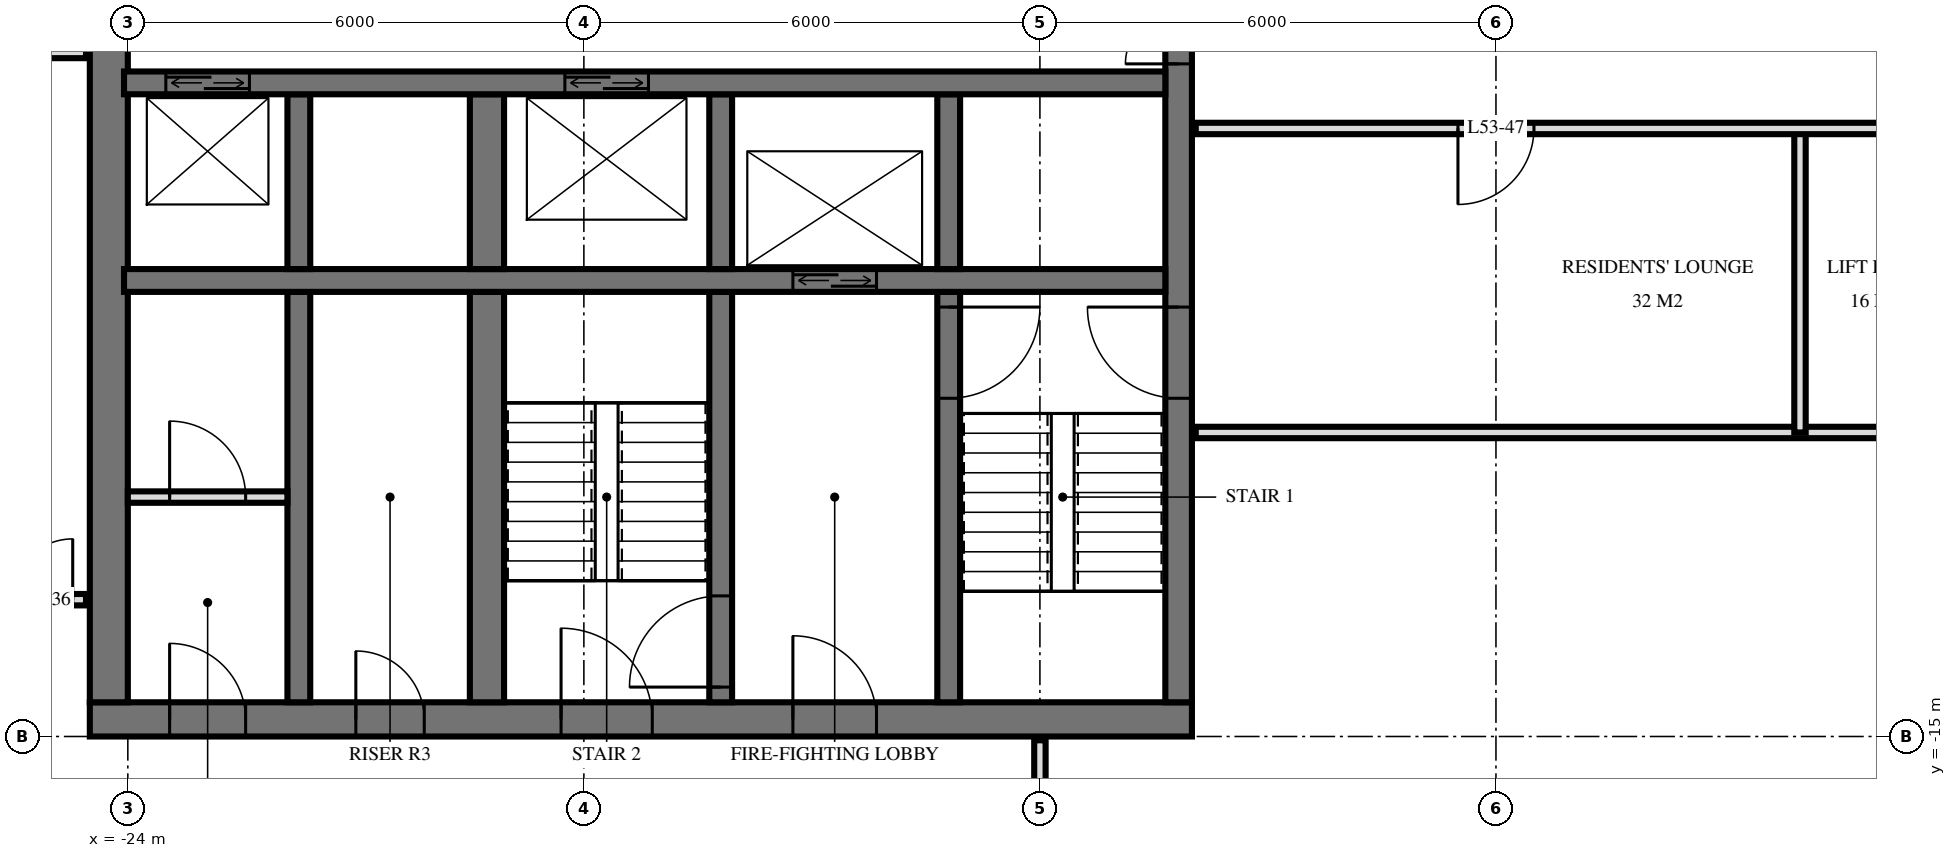
"""IFC4 building model, lengths in metres.
Left out: names, types, materials, properties, quantities, classifications, styles, units other than length and angle.
Written with IfcOpenShell. Run it as: python <this file> out.ifc"""

import sys

from ifc_helpers import new_model, si_unit, direction, frame, frame_2d, origin, place, context, subcontext, project, spatial, rectangle, extrude, element, fill, save


model = new_model("IFC4")
c1 = context("Model", 3, precision=1e-05, world=origin(), true_north=direction((0.0, 1.0)))
c2 = subcontext(c1, "Body", "Model", "MODEL_VIEW")
j1 = project(units=[si_unit("LENGTHUNIT", "METRE"), si_unit("PLANEANGLEUNIT", "RADIAN")], contexts=[c1])
p1 = place(None, origin())
s1 = spatial("IfcSite", under=j1, at=p1, CompositionType="ELEMENT")
p2 = place(p1, origin())
s2 = spatial("IfcBuilding", under=s1, at=p2, CompositionType="ELEMENT")
p3 = place(p2, frame((0.0, 0.0, 204.6)))
s3 = spatial("IfcBuildingStorey", under=s2, at=p3, CompositionType="ELEMENT", Elevation=204.6)
p4 = place(p3, frame((-24.5, -14.775, 0.0), z_axis=(0.0, 0.0, 1.0), x_axis=(1.0, 0.0, 0.0)))
e1 = element("IfcWall", 1, at=p4, inside=s3, PredefinedType="SHEAR", context=c2, shape_type="SweptSolid", body=[
    extrude(rectangle(XDim=14.5, YDim=0.45, at=frame_2d((7.25, 0.0))), origin(), (0.0, 0.0, 1.0), 3.5),
])
p5 = place(p4, frame((6.2, 0.0, 0.0)))
e2 = element("IfcOpeningElement", 2, at=p5, cuts=e1, PredefinedType="OPENING", context=c2, shape_type="SweptSolid", body=[
    extrude(rectangle(XDim=1.2, YDim=2.1, at=frame_2d((0.6, 1.05))), frame((0.0, 0.235, 0.0), z_axis=(0.0, -1.0, 0.0), x_axis=(1.0, 0.0, 0.0)), (0.0, 0.0, 1.0), 0.47),
])
p6 = place(p4, frame((9.25, 0.0, 0.0)))
e3 = element("IfcOpeningElement", 3, at=p6, cuts=e1, PredefinedType="OPENING", context=c2, shape_type="SweptSolid", body=[
    extrude(rectangle(XDim=1.1, YDim=2.1, at=frame_2d((0.55, 1.05))), frame((0.0, 0.235, 0.0), z_axis=(0.0, -1.0, 0.0), x_axis=(1.0, 0.0, 0.0)), (0.0, 0.0, 1.0), 0.47),
])
p7 = place(p4, frame((3.5, 0.0, 0.0)))
e4 = element("IfcOpeningElement", 4, at=p7, cuts=e1, PredefinedType="OPENING", context=c2, shape_type="SweptSolid", body=[
    extrude(rectangle(XDim=0.9, YDim=2.1, at=frame_2d((0.45, 1.05))), frame((0.0, 0.235, 0.0), z_axis=(0.0, -1.0, 0.0), x_axis=(1.0, 0.0, 0.0)), (0.0, 0.0, 1.0), 0.47),
])
p8 = place(p4, frame((1.05, 0.0, 0.0)))
e5 = element("IfcOpeningElement", 5, at=p8, cuts=e1, PredefinedType="OPENING", context=c2, shape_type="SweptSolid", body=[
    extrude(rectangle(XDim=1.0, YDim=2.1, at=frame_2d((0.5, 1.05))), frame((0.0, 0.235, 0.0), z_axis=(0.0, -1.0, 0.0), x_axis=(1.0, 0.0, 0.0)), (0.0, 0.0, 1.0), 0.47),
])
p9 = place(p3, frame((-10.175, -14.55, 0.0), z_axis=(0.0, 0.0, 1.0), x_axis=(0.0, 1.0, 0.0)))
e6 = element("IfcWall", 6, at=p9, inside=s3, PredefinedType="SHEAR", context=c2, shape_type="SweptSolid", body=[
    extrude(rectangle(XDim=14.1, YDim=0.35, at=frame_2d((7.05, 0.0))), origin(), (0.0, 0.0, 1.0), 3.5),
])
p10 = place(p9, frame((8.4, 0.0, 0.0)))
e7 = element("IfcOpeningElement", 7, at=p10, cuts=e6, PredefinedType="OPENING", context=c2, shape_type="SweptSolid", body=[
    extrude(rectangle(XDim=1.4, YDim=2.4, at=frame_2d((0.7, 1.2))), frame((0.0, 0.185, 0.0), z_axis=(0.0, -1.0, 0.0), x_axis=(1.0, 0.0, 0.0)), (0.0, 0.0, 1.0), 0.37),
])
p11 = place(p9, frame((10.0, 0.0, 0.0)))
e8 = element("IfcOpeningElement", 8, at=p11, cuts=e6, PredefinedType="OPENING", context=c2, shape_type="SweptSolid", body=[
    extrude(rectangle(XDim=1.4, YDim=2.4, at=frame_2d((0.7, 1.2))), frame((0.0, 0.185, 0.0), z_axis=(0.0, -1.0, 0.0), x_axis=(1.0, 0.0, 0.0)), (0.0, 0.0, 1.0), 0.37),
])
p12 = place(p9, frame((4.0, 0.0, 0.0)))
e9 = element("IfcOpeningElement", 9, at=p12, cuts=e6, PredefinedType="OPENING", context=c2, shape_type="SweptSolid", body=[
    extrude(rectangle(XDim=1.2, YDim=2.1, at=frame_2d((0.6, 1.05))), frame((0.0, 0.185, 0.0), z_axis=(0.0, -1.0, 0.0), x_axis=(1.0, 0.0, 0.0)), (0.0, 0.0, 1.0), 0.37),
])
p13 = place(p3, frame((-24.25, -14.55, 0.0), z_axis=(0.0, 0.0, 1.0), x_axis=(0.0, 1.0, 0.0)))
e10 = element("IfcWall", 10, at=p13, inside=s3, PredefinedType="SHEAR", context=c2, shape_type="SweptSolid", body=[
    extrude(rectangle(XDim=14.1, YDim=0.5, at=frame_2d((7.05, 0.0))), origin(), (0.0, 0.0, 1.0), 3.5),
])
p14 = place(p3, frame((-24.05, -6.4, 0.0), z_axis=(0.0, 0.0, 1.0), x_axis=(1.0, 0.0, 0.0)))
e11 = element("IfcWall", 11, at=p14, inside=s3, PredefinedType="SHEAR", context=c2, shape_type="SweptSolid", body=[
    extrude(rectangle(XDim=13.7, YDim=0.3, at=frame_2d((6.85, 0.0))), origin(), (0.0, 0.0, 1.0), 3.5),
])
p15 = place(p14, frame((0.55, 0.0, 0.0)))
e12 = element("IfcOpeningElement", 12, at=p15, cuts=e11, PredefinedType="OPENING", context=c2, shape_type="SweptSolid", body=[
    extrude(rectangle(XDim=1.1, YDim=2.1, at=frame_2d((0.55, 1.05))), frame((0.0, 0.16, 0.0), z_axis=(0.0, -1.0, 0.0), x_axis=(1.0, 0.0, 0.0)), (0.0, 0.0, 1.0), 0.32),
])
p16 = place(p14, frame((5.8, 0.0, 0.0)))
e13 = element("IfcOpeningElement", 13, at=p16, cuts=e11, PredefinedType="OPENING", context=c2, shape_type="SweptSolid", body=[
    extrude(rectangle(XDim=1.1, YDim=2.1, at=frame_2d((0.55, 1.05))), frame((0.0, 0.16, 0.0), z_axis=(0.0, -1.0, 0.0), x_axis=(1.0, 0.0, 0.0)), (0.0, 0.0, 1.0), 0.32),
])
p17 = place(p3, frame((-24.05, -9.0, 0.0), z_axis=(0.0, 0.0, 1.0), x_axis=(1.0, 0.0, 0.0)))
e14 = element("IfcWall", 14, at=p17, inside=s3, PredefinedType="SHEAR", context=c2, shape_type="SweptSolid", body=[
    extrude(rectangle(XDim=13.7, YDim=0.3, at=frame_2d((6.85, 0.0))), origin(), (0.0, 0.0, 1.0), 3.5),
])
p18 = place(p17, frame((8.8, 0.0, 0.0)))
e15 = element("IfcOpeningElement", 15, at=p18, cuts=e14, PredefinedType="OPENING", context=c2, shape_type="SweptSolid", body=[
    extrude(rectangle(XDim=1.1, YDim=2.1, at=frame_2d((0.55, 1.05))), frame((0.0, 0.16, 0.0), z_axis=(0.0, -1.0, 0.0), x_axis=(1.0, 0.0, 0.0)), (0.0, 0.0, 1.0), 0.32),
])
p19 = place(p3, frame((-13.2, -8.85, 0.0), z_axis=(0.0, 0.0, 1.0), x_axis=(0.0, 1.0, 0.0)))
e16 = element("IfcWall", 16, at=p19, inside=s3, PredefinedType="SHEAR", context=c2, shape_type="SweptSolid", body=[
    extrude(rectangle(XDim=2.3, YDim=0.3, at=frame_2d((1.15, 0.0))), origin(), (0.0, 0.0, 1.0), 3.5),
])
p20 = place(p3, frame((-13.2, -14.55, 0.0), z_axis=(0.0, 0.0, 1.0), x_axis=(0.0, 1.0, 0.0)))
e17 = element("IfcWall", 17, at=p20, inside=s3, PredefinedType="SHEAR", context=c2, shape_type="SweptSolid", body=[
    extrude(rectangle(XDim=5.4, YDim=0.3, at=frame_2d((2.7, 0.0))), origin(), (0.0, 0.0, 1.0), 3.5),
])
p21 = place(p20, frame((4.0, 0.0, 0.0)))
e18 = element("IfcOpeningElement", 18, at=p21, cuts=e17, PredefinedType="OPENING", context=c2, shape_type="SweptSolid", body=[
    extrude(rectangle(XDim=1.2, YDim=2.1, at=frame_2d((0.6, 1.05))), frame((0.0, 0.16, 0.0), z_axis=(0.0, -1.0, 0.0), x_axis=(1.0, 0.0, 0.0)), (0.0, 0.0, 1.0), 0.32),
])
p22 = place(p3, frame((-16.2, -8.85, 0.0), z_axis=(0.0, 0.0, 1.0), x_axis=(0.0, 1.0, 0.0)))
e19 = element("IfcWall", 19, at=p22, inside=s3, PredefinedType="SHEAR", context=c2, shape_type="SweptSolid", body=[
    extrude(rectangle(XDim=2.3, YDim=0.3, at=frame_2d((1.15, 0.0))), origin(), (0.0, 0.0, 1.0), 3.5),
])
p23 = place(p3, frame((-16.2, -14.55, 0.0), z_axis=(0.0, 0.0, 1.0), x_axis=(0.0, 1.0, 0.0)))
e20 = element("IfcWall", 20, at=p23, inside=s3, PredefinedType="SHEAR", context=c2, shape_type="SweptSolid", body=[
    extrude(rectangle(XDim=5.4, YDim=0.3, at=frame_2d((2.7, 0.0))), origin(), (0.0, 0.0, 1.0), 3.5),
])
p24 = place(p23, frame((0.2, 0.0, 0.0)))
e21 = element("IfcOpeningElement", 21, at=p24, cuts=e20, PredefinedType="OPENING", context=c2, shape_type="SweptSolid", body=[
    extrude(rectangle(XDim=1.2, YDim=2.1, at=frame_2d((0.6, 1.05))), frame((0.0, 0.16, 0.0), z_axis=(0.0, -1.0, 0.0), x_axis=(1.0, 0.0, 0.0)), (0.0, 0.0, 1.0), 0.32),
])
p25 = place(p3, frame((-19.275, -8.85, 0.0), z_axis=(0.0, 0.0, 1.0), x_axis=(0.0, 1.0, 0.0)))
e22 = element("IfcWall", 22, at=p25, inside=s3, PredefinedType="SHEAR", context=c2, shape_type="SweptSolid", body=[
    extrude(rectangle(XDim=2.3, YDim=0.45, at=frame_2d((1.15, 0.0))), origin(), (0.0, 0.0, 1.0), 3.5),
])
p26 = place(p3, frame((-19.275, -14.55, 0.0), z_axis=(0.0, 0.0, 1.0), x_axis=(0.0, 1.0, 0.0)))
e23 = element("IfcWall", 23, at=p26, inside=s3, PredefinedType="SHEAR", context=c2, shape_type="SweptSolid", body=[
    extrude(rectangle(XDim=5.4, YDim=0.45, at=frame_2d((2.7, 0.0))), origin(), (0.0, 0.0, 1.0), 3.5),
])
p27 = place(p3, frame((-21.75, -8.85, 0.0), z_axis=(0.0, 0.0, 1.0), x_axis=(0.0, 1.0, 0.0)))
e24 = element("IfcWall", 24, at=p27, inside=s3, PredefinedType="SHEAR", context=c2, shape_type="SweptSolid", body=[
    extrude(rectangle(XDim=2.3, YDim=0.3, at=frame_2d((1.15, 0.0))), origin(), (0.0, 0.0, 1.0), 3.5),
])
p28 = place(p3, frame((-21.75, -14.55, 0.0), z_axis=(0.0, 0.0, 1.0), x_axis=(0.0, 1.0, 0.0)))
e25 = element("IfcWall", 25, at=p28, inside=s3, PredefinedType="SHEAR", context=c2, shape_type="SweptSolid", body=[
    extrude(rectangle(XDim=5.4, YDim=0.3, at=frame_2d((2.7, 0.0))), origin(), (0.0, 0.0, 1.0), 3.5),
])
p29 = place(p3, frame((-24.0, -11.85, 0.0), z_axis=(0.0, 0.0, 1.0), x_axis=(1.0, 0.0, 0.0)))
e26 = element("IfcWall", 26, at=p29, inside=s3, PredefinedType="PARTITIONING", context=c2, shape_type="SweptSolid", body=[
    extrude(rectangle(XDim=2.1, YDim=0.15, at=frame_2d((1.05, 0.0))), origin(), (0.0, 0.0, 1.0), 3.2),
])
p30 = place(p29, frame((0.55, 0.0, 0.0)))
e27 = element("IfcOpeningElement", 27, at=p30, cuts=e26, PredefinedType="OPENING", context=c2, shape_type="SweptSolid", body=[
    extrude(rectangle(XDim=1.0, YDim=2.1, at=frame_2d((0.5, 1.05))), frame((0.0, 0.085, 0.0), z_axis=(0.0, -1.0, 0.0), x_axis=(1.0, 0.0, 0.0)), (0.0, 0.0, 1.0), 0.17),
])
p31 = place(p3, frame((-2.0, -11.0, 0.0), z_axis=(0.0, 0.0, 1.0), x_axis=(0.0, 1.0, 0.0)))
e28 = element("IfcWall", 28, at=p31, inside=s3, PredefinedType="PARTITIONING", context=c2, shape_type="SweptSolid", body=[
    extrude(rectangle(XDim=4.0, YDim=0.15, at=frame_2d((2.0, 0.0))), origin(), (0.0, 0.0, 1.0), 3.22),
])
p32 = place(p3, frame((-12.0, -17.4, 0.0), z_axis=(0.0, 0.0, 1.0), x_axis=(0.0, 1.0, 0.0)))
e29 = element("IfcWall", 29, at=p32, inside=s3, PredefinedType="PARTITIONING", context=c2, shape_type="SweptSolid", body=[
    extrude(rectangle(XDim=2.35, YDim=0.15, at=frame_2d((1.175, 0.0))), origin(), (0.0, 0.0, 1.0), 3.22),
])
p33 = place(p32, frame((0.7, 0.0, 0.0)))
e30 = element("IfcOpeningElement", 30, at=p33, cuts=e29, PredefinedType="OPENING", context=c2, shape_type="SweptSolid", body=[
    extrude(rectangle(XDim=1.0, YDim=2.1, at=frame_2d((0.5, 1.05))), frame((0.0, 0.085, 0.0), z_axis=(0.0, -1.0, 0.0), x_axis=(1.0, 0.0, 0.0)), (0.0, 0.0, 1.0), 0.17),
])
p34 = place(p3, frame((-25.7, -13.2, 0.0), z_axis=(0.0, 0.0, 1.0), x_axis=(1.0, 0.0, 0.0)))
e31 = element("IfcWall", 31, at=p34, inside=s3, PredefinedType="PARTITIONING", context=c2, shape_type="SweptSolid", body=[
    extrude(rectangle(XDim=1.15, YDim=0.15, at=frame_2d((0.575, 0.0))), origin(), (0.0, 0.0, 1.0), 3.22),
])
p35 = place(p34, frame((0.175, 0.0, 0.0)))
e32 = element("IfcOpeningElement", 32, at=p35, cuts=e31, PredefinedType="OPENING", context=c2, shape_type="SweptSolid", body=[
    extrude(rectangle(XDim=0.8, YDim=2.1, at=frame_2d((0.4, 1.05))), frame((0.0, 0.085, 0.0), z_axis=(0.0, -1.0, 0.0), x_axis=(1.0, 0.0, 0.0)), (0.0, 0.0, 1.0), 0.17),
])
p36 = place(p3, frame((-9.95, -11.0, 0.0), z_axis=(0.0, 0.0, 1.0), x_axis=(1.0, 0.0, 0.0)))
e33 = element("IfcWall", 33, at=p36, inside=s3, PredefinedType="PARTITIONING", context=c2, shape_type="SweptSolid", body=[
    extrude(rectangle(XDim=19.9, YDim=0.15, at=frame_2d((9.95, 0.0))), origin(), (0.0, 0.0, 1.0), 3.22),
])
p37 = place(p36, frame((9.45, 0.0, 0.0)))
e34 = element("IfcOpeningElement", 34, at=p37, cuts=e33, PredefinedType="OPENING", context=c2, shape_type="SweptSolid", body=[
    extrude(rectangle(XDim=1.0, YDim=2.1, at=frame_2d((0.5, 1.05))), frame((0.0, 0.085, 0.0), z_axis=(0.0, -1.0, 0.0), x_axis=(1.0, 0.0, 0.0)), (0.0, 0.0, 1.0), 0.17),
])
p38 = place(p36, frame((15.45, 0.0, 0.0)))
e35 = element("IfcOpeningElement", 35, at=p38, cuts=e33, PredefinedType="OPENING", context=c2, shape_type="SweptSolid", body=[
    extrude(rectangle(XDim=1.0, YDim=2.1, at=frame_2d((0.5, 1.05))), frame((0.0, 0.085, 0.0), z_axis=(0.0, -1.0, 0.0), x_axis=(1.0, 0.0, 0.0)), (0.0, 0.0, 1.0), 0.17),
])
p39 = place(p3, frame((-9.95, -7.0, 0.0), z_axis=(0.0, 0.0, 1.0), x_axis=(1.0, 0.0, 0.0)))
e36 = element("IfcWall", 36, at=p39, inside=s3, PredefinedType="PARTITIONING", context=c2, shape_type="SweptSolid", body=[
    extrude(rectangle(XDim=19.9, YDim=0.15, at=frame_2d((9.95, 0.0))), origin(), (0.0, 0.0, 1.0), 3.22),
])
p40 = place(p39, frame((9.45, 0.0, 0.0)))
e37 = element("IfcOpeningElement", 37, at=p40, cuts=e36, PredefinedType="OPENING", context=c2, shape_type="SweptSolid", body=[
    extrude(rectangle(XDim=1.0, YDim=2.1, at=frame_2d((0.5, 1.05))), frame((0.0, 0.085, 0.0), z_axis=(0.0, -1.0, 0.0), x_axis=(1.0, 0.0, 0.0)), (0.0, 0.0, 1.0), 0.17),
])
p41 = place(p39, frame((3.45, 0.0, 0.0)))
e38 = element("IfcOpeningElement", 38, at=p41, cuts=e36, PredefinedType="OPENING", context=c2, shape_type="SweptSolid", body=[
    extrude(rectangle(XDim=1.0, YDim=2.1, at=frame_2d((0.5, 1.05))), frame((0.0, 0.085, 0.0), z_axis=(0.0, -1.0, 0.0), x_axis=(1.0, 0.0, 0.0)), (0.0, 0.0, 1.0), 0.17),
])
p42 = place(p3, frame((-26.82, -6.0, 0.0), z_axis=(0.0, 0.0, 1.0), x_axis=(1.0, 0.0, 0.0)))
e39 = element("IfcWall", 39, at=p42, inside=s3, PredefinedType="PARTITIONING", context=c2, shape_type="SweptSolid", body=[
    extrude(rectangle(XDim=2.27, YDim=0.15, at=frame_2d((1.135, 0.0))), origin(), (0.0, 0.0, 1.0), 3.22),
])
p43 = place(p42, frame((0.62, 0.0, 0.0)))
e40 = element("IfcOpeningElement", 40, at=p43, cuts=e39, PredefinedType="OPENING", context=c2, shape_type="SweptSolid", body=[
    extrude(rectangle(XDim=0.9, YDim=2.1, at=frame_2d((0.45, 1.05))), frame((0.0, 0.085, 0.0), z_axis=(0.0, -1.0, 0.0), x_axis=(1.0, 0.0, 0.0)), (0.0, 0.0, 1.0), 0.17),
])
p44 = place(p15, origin())
e41 = element("IfcDoor", 41, at=p44, inside=s3, OperationType="DOUBLE_DOOR_SLIDING", PredefinedType="USERDEFINED", context=c2, shape_type="SweptSolid", body=[
    extrude(rectangle(XDim=1.1, YDim=2.1, at=frame_2d((0.55, 1.05))), frame((0.0, 0.025, 0.0), z_axis=(0.0, -1.0, 0.0), x_axis=(1.0, 0.0, 0.0)), (0.0, 0.0, 1.0), 0.05),
])
fill(e12, e41)
p45 = place(p18, origin())
e42 = element("IfcDoor", 42, at=p45, inside=s3, OperationType="DOUBLE_DOOR_SLIDING", PredefinedType="USERDEFINED", context=c2, shape_type="SweptSolid", body=[
    extrude(rectangle(XDim=1.1, YDim=2.1, at=frame_2d((0.55, 1.05))), frame((0.0, 0.025, 0.0), z_axis=(0.0, -1.0, 0.0), x_axis=(1.0, 0.0, 0.0)), (0.0, 0.0, 1.0), 0.05),
])
fill(e15, e42)
p46 = place(p16, origin())
e43 = element("IfcDoor", 43, at=p46, inside=s3, OperationType="DOUBLE_DOOR_SLIDING", PredefinedType="USERDEFINED", context=c2, shape_type="SweptSolid", body=[
    extrude(rectangle(XDim=1.1, YDim=2.1, at=frame_2d((0.55, 1.05))), frame((0.0, 0.025, 0.0), z_axis=(0.0, -1.0, 0.0), x_axis=(1.0, 0.0, 0.0)), (0.0, 0.0, 1.0), 0.05),
])
fill(e13, e43)
p47 = place(p10, origin())
e44 = element("IfcDoor", 44, at=p47, inside=s3, OperationType="DOUBLE_DOOR_SINGLE_SWING", PredefinedType="DOOR", context=c2, shape_type="SweptSolid", body=[
    extrude(rectangle(XDim=1.4, YDim=2.4, at=frame_2d((0.7, 1.2))), frame((0.0, 0.025, 0.0), z_axis=(0.0, -1.0, 0.0), x_axis=(1.0, 0.0, 0.0)), (0.0, 0.0, 1.0), 0.05),
])
fill(e7, e44)
p48 = place(p12, origin())
e45 = element("IfcDoor", 45, at=p48, inside=s3, OperationType="SINGLE_SWING_LEFT", PredefinedType="DOOR", context=c2, shape_type="SweptSolid", body=[
    extrude(rectangle(XDim=1.2, YDim=2.1, at=frame_2d((0.6, 1.05))), frame((0.0, 0.025, 0.0), z_axis=(0.0, -1.0, 0.0), x_axis=(1.0, 0.0, 0.0)), (0.0, 0.0, 1.0), 0.05),
])
fill(e9, e45)
p49 = place(p5, origin())
e46 = element("IfcDoor", 46, at=p49, inside=s3, OperationType="SINGLE_SWING_RIGHT", PredefinedType="DOOR", context=c2, shape_type="SweptSolid", body=[
    extrude(rectangle(XDim=1.2, YDim=2.1, at=frame_2d((0.6, 1.05))), frame((0.0, 0.025, 0.0), z_axis=(0.0, -1.0, 0.0), x_axis=(1.0, 0.0, 0.0)), (0.0, 0.0, 1.0), 0.05),
])
fill(e2, e46)
p50 = place(p6, origin())
e47 = element("IfcDoor", 47, at=p50, inside=s3, OperationType="SINGLE_SWING_RIGHT", PredefinedType="DOOR", context=c2, shape_type="SweptSolid", body=[
    extrude(rectangle(XDim=1.1, YDim=2.1, at=frame_2d((0.55, 1.05))), frame((0.0, 0.025, 0.0), z_axis=(0.0, -1.0, 0.0), x_axis=(1.0, 0.0, 0.0)), (0.0, 0.0, 1.0), 0.05),
])
fill(e3, e47)
p51 = place(p7, origin())
e48 = element("IfcDoor", 48, at=p51, inside=s3, OperationType="SINGLE_SWING_RIGHT", PredefinedType="DOOR", context=c2, shape_type="SweptSolid", body=[
    extrude(rectangle(XDim=0.9, YDim=2.1, at=frame_2d((0.45, 1.05))), frame((0.0, 0.025, 0.0), z_axis=(0.0, -1.0, 0.0), x_axis=(1.0, 0.0, 0.0)), (0.0, 0.0, 1.0), 0.05),
])
fill(e4, e48)
p52 = place(p8, origin())
e49 = element("IfcDoor", 49, at=p52, inside=s3, OperationType="SINGLE_SWING_RIGHT", PredefinedType="DOOR", context=c2, shape_type="SweptSolid", body=[
    extrude(rectangle(XDim=1.0, YDim=2.1, at=frame_2d((0.5, 1.05))), frame((0.0, 0.025, 0.0), z_axis=(0.0, -1.0, 0.0), x_axis=(1.0, 0.0, 0.0)), (0.0, 0.0, 1.0), 0.05),
])
fill(e5, e49)
p53 = place(p21, frame((0.6, 0.0, 0.0), z_axis=(0.0, 0.0, 1.0), x_axis=(-1.0, 0.0, 0.0)))
e50 = element("IfcDoor", 50, at=p53, inside=s3, OperationType="SINGLE_SWING_RIGHT", PredefinedType="DOOR", context=c2, shape_type="SweptSolid", body=[
    extrude(rectangle(XDim=1.2, YDim=2.1, at=frame_2d((0.0, 1.05))), frame((0.0, -0.025, 0.0), z_axis=(0.0, 1.0, 0.0), x_axis=(-1.0, 0.0, 0.0)), (0.0, 0.0, 1.0), 0.05),
])
fill(e18, e50)
p54 = place(p24, origin())
e51 = element("IfcDoor", 51, at=p54, inside=s3, OperationType="SINGLE_SWING_RIGHT", PredefinedType="DOOR", context=c2, shape_type="SweptSolid", body=[
    extrude(rectangle(XDim=1.2, YDim=2.1, at=frame_2d((0.6, 1.05))), frame((0.0, 0.025, 0.0), z_axis=(0.0, -1.0, 0.0), x_axis=(1.0, 0.0, 0.0)), (0.0, 0.0, 1.0), 0.05),
])
fill(e21, e51)
p55 = place(p30, origin())
e52 = element("IfcDoor", 52, at=p55, inside=s3, OperationType="SINGLE_SWING_RIGHT", PredefinedType="DOOR", context=c2, shape_type="SweptSolid", body=[
    extrude(rectangle(XDim=1.0, YDim=2.1, at=frame_2d((0.5, 1.05))), frame((0.0, 0.025, 0.0), z_axis=(0.0, -1.0, 0.0), x_axis=(1.0, 0.0, 0.0)), (0.0, 0.0, 1.0), 0.05),
])
fill(e27, e52)
p56 = place(p35, origin())
e53 = element("IfcDoor", 53, at=p56, inside=s3, OperationType="SINGLE_SWING_LEFT", PredefinedType="DOOR", context=c2, shape_type="SweptSolid", body=[
    extrude(rectangle(XDim=0.8, YDim=2.1, at=frame_2d((0.4, 1.05))), frame((0.0, 0.025, 0.0), z_axis=(0.0, -1.0, 0.0), x_axis=(1.0, 0.0, 0.0)), (0.0, 0.0, 1.0), 0.05),
])
fill(e32, e53)
p57 = place(p41, frame((0.5, 0.0, 0.0), z_axis=(0.0, 0.0, 1.0), x_axis=(-1.0, 0.0, 0.0)))
e54 = element("IfcDoor", 54, at=p57, inside=s3, OperationType="SINGLE_SWING_LEFT", PredefinedType="DOOR", context=c2, shape_type="SweptSolid", body=[
    extrude(rectangle(XDim=1.0, YDim=2.1, at=frame_2d((0.0, 1.05))), frame((0.0, -0.025, 0.0), z_axis=(0.0, 1.0, 0.0), x_axis=(-1.0, 0.0, 0.0)), (0.0, 0.0, 1.0), 0.05),
])
fill(e38, e54)
save(model, sys.argv[1])
